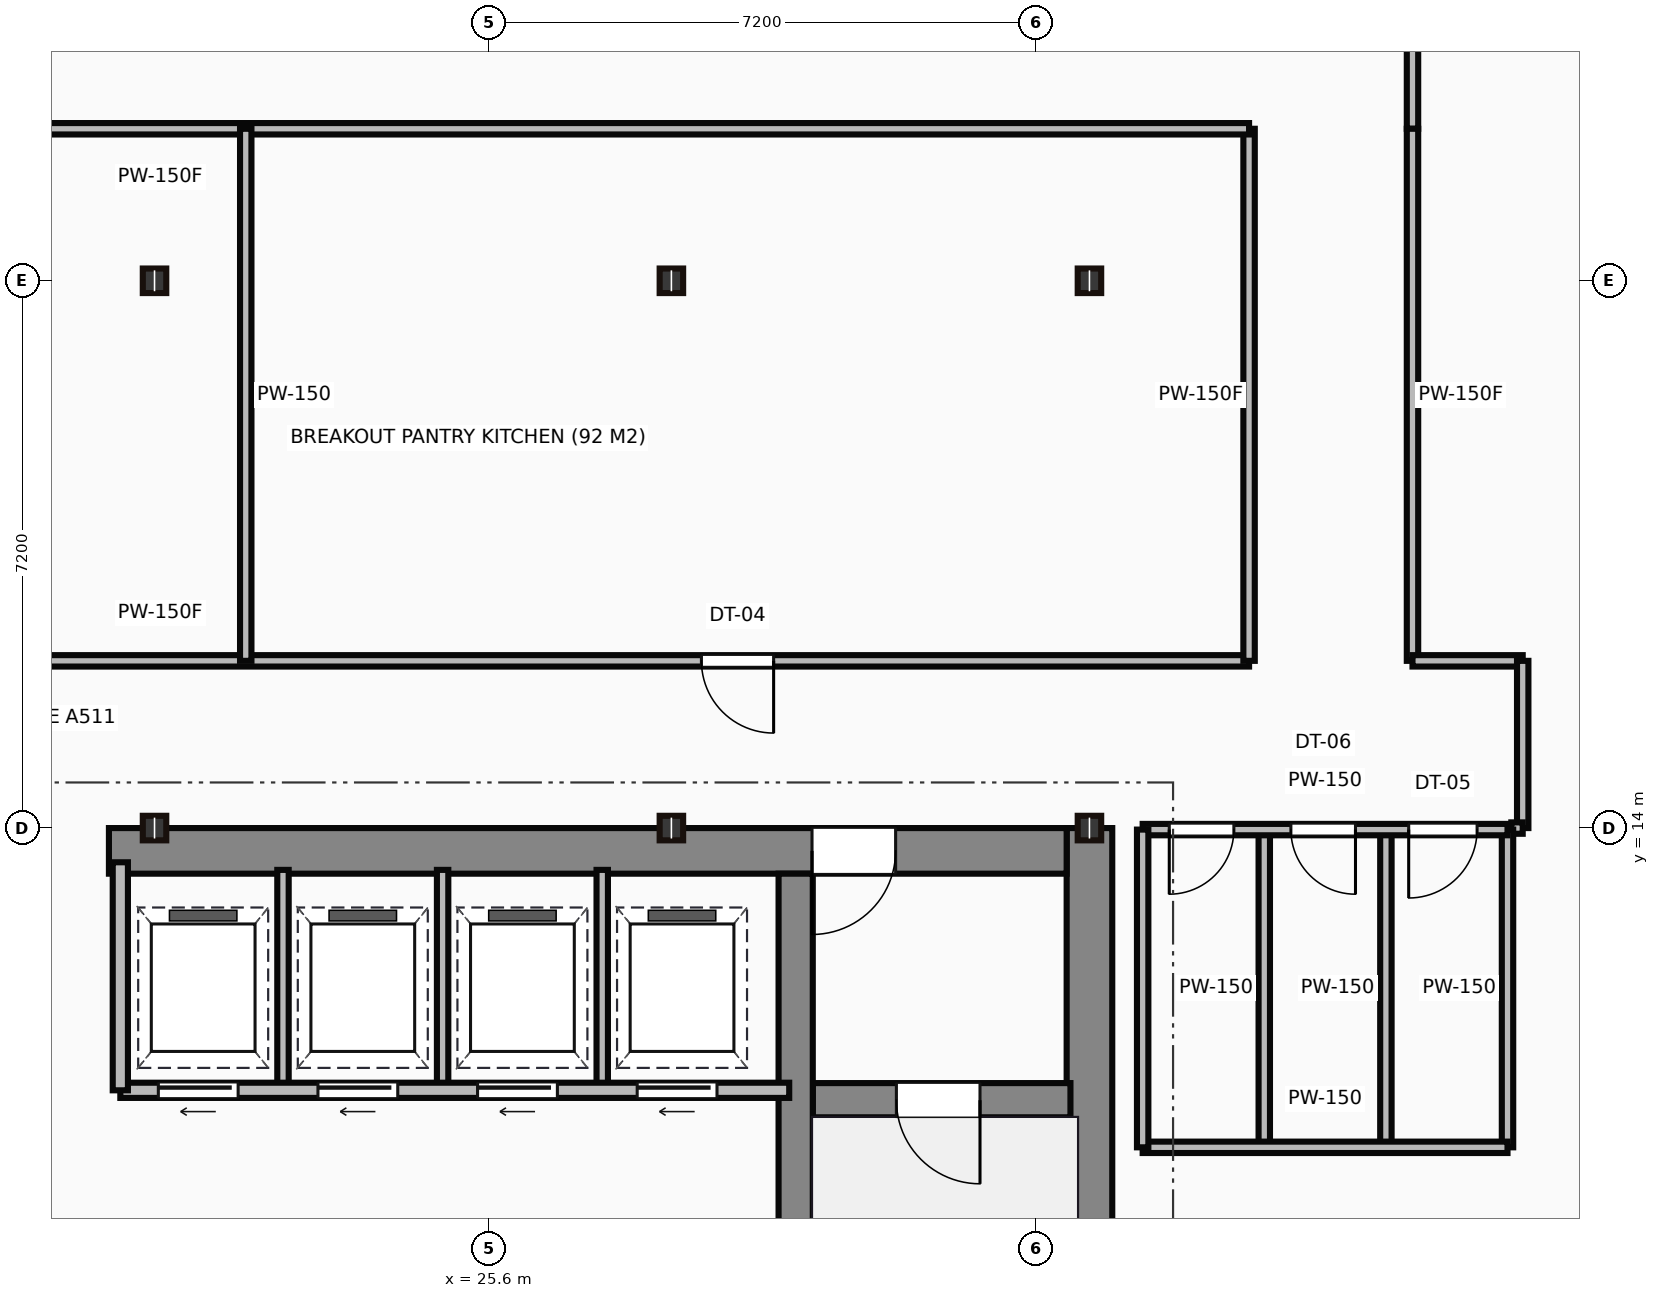
"""IFC4 building model, lengths in metres.
Left out: names, types, materials, properties, quantities, classifications, styles, units other than length and angle.
Written with IfcOpenShell. Run it as: python <this file> out.ifc"""

import sys

from ifc_helpers import new_model, si_unit, direction, frame, frame_2d, origin, origin_2d, place, context, subcontext, project, spatial, rectangle, i_section, extrude, source, transform, mapped, element, fill, save


model = new_model("IFC4")
c1 = context("Model", 3, precision=1e-05, world=origin(), true_north=direction((0.0, 1.0)))
c2 = subcontext(c1, "Body", "Model", "MODEL_VIEW")
j1 = project(units=[si_unit("LENGTHUNIT", "METRE"), si_unit("PLANEANGLEUNIT", "RADIAN")], contexts=[c1])
p1 = place(None, origin())
s1 = spatial("IfcSite", under=j1, at=p1, CompositionType="ELEMENT")
p2 = place(p1, origin())
s2 = spatial("IfcBuilding", under=s1, at=p2, CompositionType="ELEMENT")
p3 = place(p2, frame((0.0, 0.0, 251.5)))
s3 = spatial("IfcBuildingStorey", under=s2, at=p3, CompositionType="ELEMENT", Elevation=251.5)
m1 = source(origin(), c2, "Body", "SweptSolid", [
    extrude(rectangle(XDim=13.1, YDim=0.6, at=frame_2d((6.55, 0.0))), origin(), (0.0, 0.0, 1.0), 3.65),
])
p4 = place(p3, frame((33.5, 0.9, 0.0), z_axis=(0.0, 0.0, 1.0), x_axis=(0.0, 1.0, 0.0)))
e1 = element("IfcWall", 1, at=p4, inside=s3, PredefinedType="SHEAR", context=c2, shape_type="MappedRepresentation", body=[
    mapped(m1, transform((0.0, 0.0, 0.0))),
])
m2 = source(origin(), c2, "Body", "SweptSolid", [
    extrude(rectangle(XDim=12.6, YDim=0.6, at=frame_2d((6.3, 0.0))), origin(), (0.0, 0.0, 1.0), 3.65),
])
p5 = place(p3, frame((20.6, 13.7, 0.0), z_axis=(0.0, 0.0, 1.0), x_axis=(1.0, 0.0, 0.0)))
e2 = element("IfcWall", 2, at=p5, inside=s3, PredefinedType="SHEAR", context=c2, shape_type="MappedRepresentation", body=[
    mapped(m2, transform((0.0, 0.0, 0.0))),
])
p6 = place(p5, frame((9.25, 0.0, 0.0)))
e3 = element("IfcOpeningElement", 3, at=p6, cuts=e2, PredefinedType="OPENING", context=c2, shape_type="SweptSolid", body=[
    extrude(rectangle(XDim=1.1, YDim=2.15, at=frame_2d((0.55, 1.075))), frame((0.0, 0.31, 0.0), z_axis=(0.0, -1.0, 0.0), x_axis=(1.0, 0.0, 0.0)), (0.0, 0.0, 1.0), 0.62),
])
m3 = source(origin(), c2, "Body", "SweptSolid", [
    extrude(rectangle(XDim=12.5, YDim=0.45, at=frame_2d((6.25, 0.0))), origin(), (0.0, 0.0, 1.0), 3.65),
])
p7 = place(p3, frame((29.635, 0.9, 0.0), z_axis=(0.0, 0.0, 1.0), x_axis=(0.0, 1.0, 0.0)))
e4 = element("IfcWall", 4, at=p7, inside=s3, PredefinedType="SHEAR", context=c2, shape_type="MappedRepresentation", body=[
    mapped(m3, transform((0.0, 0.0, 0.0))),
])
m4 = source(origin(), c2, "Body", "SweptSolid", [
    extrude(rectangle(XDim=3.39, YDim=0.45, at=frame_2d((1.695, 0.0))), origin(), (0.0, 0.0, 1.0), 3.65),
])
p8 = place(p3, frame((29.86, 10.42, 0.0), z_axis=(0.0, 0.0, 1.0), x_axis=(1.0, 0.0, 0.0)))
e5 = element("IfcWall", 5, at=p8, inside=s3, PredefinedType="SHEAR", context=c2, shape_type="MappedRepresentation", body=[
    mapped(m4, transform((0.0, 0.0, 0.0))),
])
p9 = place(p8, frame((1.1, 0.0, 0.0)))
e6 = element("IfcOpeningElement", 6, at=p9, cuts=e5, PredefinedType="OPENING", context=c2, shape_type="SweptSolid", body=[
    extrude(rectangle(XDim=1.1, YDim=2.15, at=frame_2d((0.55, 1.075))), frame((0.0, 0.235, 0.0), z_axis=(0.0, -1.0, 0.0), x_axis=(1.0, 0.0, 0.0)), (0.0, 0.0, 1.0), 0.47),
])
m5 = source(origin(), c2, "Body", "SweptSolid", [
    extrude(i_section(OverallWidth=0.309, OverallDepth=0.323, WebThickness=0.014, FlangeThickness=0.023, at=origin_2d()), origin(), (0.0, 0.0, 1.0), 3.65),
])
for number, where, z_axis, x_axis in (
    (7, (21.2, 14.0, 0.0), (0.0, 0.0, 1.0), (1.0, 0.0, 0.0)),
    (8, (21.2, 21.2, 0.0), (0.0, 0.0, 1.0), (1.0, 0.0, 0.0)),
    (9, (28.0, 14.0, 0.0), (0.0, 0.0, 1.0), (1.0, 0.0, 0.0)),
    (10, (28.0, 21.2, 0.0), (0.0, 0.0, 1.0), (1.0, 0.0, 0.0)),
    (11, (33.5, 14.0, 0.0), (0.0, 0.0, 1.0), (1.0, 0.0, 0.0)),
    (12, (33.5, 21.2, 0.0), (0.0, 0.0, 1.0), (1.0, 0.0, 0.0)),
):
    element("IfcColumn", number, at=place(p3, frame(where, z_axis=z_axis, x_axis=x_axis)), inside=s3, PredefinedType="COLUMN", context=c2, shape_type="MappedRepresentation", body=[
        mapped(m5, transform((0.0, 0.0, 0.0))),
    ])
m6 = source(origin(), c2, "Body", "SweptSolid", [
    extrude(rectangle(XDim=8.8, YDim=0.2, at=frame_2d((4.4, 0.0))), origin(), (0.0, 0.0, 1.0), 3.4),
])
p10 = place(p3, frame((20.75, 10.55, 0.0), z_axis=(0.0, 0.0, 1.0), x_axis=(1.0, 0.0, 0.0)))
e13 = element("IfcWall", 13, at=p10, inside=s3, PredefinedType="PARTITIONING", context=c2, shape_type="MappedRepresentation", body=[
    mapped(m6, transform((0.0, 0.0, 0.0))),
])
p11 = place(p10, frame((0.5, 0.0, 0.0)))
e14 = element("IfcOpeningElement", 14, at=p11, cuts=e13, PredefinedType="OPENING", context=c2, shape_type="SweptSolid", body=[
    extrude(rectangle(XDim=1.05, YDim=2.15, at=frame_2d((0.525, 1.075))), frame((0.0, 0.11, 0.0), z_axis=(0.0, -1.0, 0.0), x_axis=(1.0, 0.0, 0.0)), (0.0, 0.0, 1.0), 0.22),
])
p12 = place(p10, frame((2.6, 0.0, 0.0)))
e15 = element("IfcOpeningElement", 15, at=p12, cuts=e13, PredefinedType="OPENING", context=c2, shape_type="SweptSolid", body=[
    extrude(rectangle(XDim=1.05, YDim=2.15, at=frame_2d((0.525, 1.075))), frame((0.0, 0.11, 0.0), z_axis=(0.0, -1.0, 0.0), x_axis=(1.0, 0.0, 0.0)), (0.0, 0.0, 1.0), 0.22),
])
p13 = place(p10, frame((4.7, 0.0, 0.0)))
e16 = element("IfcOpeningElement", 16, at=p13, cuts=e13, PredefinedType="OPENING", context=c2, shape_type="SweptSolid", body=[
    extrude(rectangle(XDim=1.05, YDim=2.15, at=frame_2d((0.525, 1.075))), frame((0.0, 0.11, 0.0), z_axis=(0.0, -1.0, 0.0), x_axis=(1.0, 0.0, 0.0)), (0.0, 0.0, 1.0), 0.22),
])
p14 = place(p10, frame((6.8, 0.0, 0.0)))
e17 = element("IfcOpeningElement", 17, at=p14, cuts=e13, PredefinedType="OPENING", context=c2, shape_type="SweptSolid", body=[
    extrude(rectangle(XDim=1.05, YDim=2.15, at=frame_2d((0.525, 1.075))), frame((0.0, 0.11, 0.0), z_axis=(0.0, -1.0, 0.0), x_axis=(1.0, 0.0, 0.0)), (0.0, 0.0, 1.0), 0.22),
])
m7 = source(origin(), c2, "Body", "SweptSolid", [
    extrude(rectangle(XDim=3.0, YDim=0.2, at=frame_2d((1.5, 0.0))), origin(), (0.0, 0.0, 1.0), 3.4),
])
p15 = place(p3, frame((20.75, 10.55, 0.0), z_axis=(0.0, 0.0, 1.0), x_axis=(0.0, 1.0, 0.0)))
e18 = element("IfcWall", 18, at=p15, inside=s3, PredefinedType="PARTITIONING", context=c2, shape_type="MappedRepresentation", body=[
    mapped(m7, transform((0.0, 0.0, 0.0))),
])
m8 = source(origin(), c2, "Body", "SweptSolid", [
    extrude(rectangle(XDim=2.85, YDim=0.15, at=frame_2d((1.425, 0.0))), origin(), (0.0, 0.0, 1.0), 3.4),
])
for number, where, z_axis, x_axis in (
    (19, (22.89, 10.6, 0.0), (0.0, 0.0, 1.0), (0.0, 1.0, 0.0)),
    (20, (24.99, 10.6, 0.0), (0.0, 0.0, 1.0), (0.0, 1.0, 0.0)),
    (21, (27.09, 10.6, 0.0), (0.0, 0.0, 1.0), (0.0, 1.0, 0.0)),
):
    element("IfcWall", number, at=place(p3, frame(where, z_axis=z_axis, x_axis=x_axis)), inside=s3, PredefinedType="PARTITIONING", context=c2, shape_type="MappedRepresentation", body=[
        mapped(m8, transform((0.0, 0.0, 0.0))),
    ])
m9 = source(origin(), c2, "Body", "SweptSolid", [
    extrude(rectangle(XDim=4.8, YDim=0.15, at=frame_2d((2.4, 0.0))), origin(), (0.0, 0.0, 1.0), 2.787),
])
p16 = place(p3, frame((34.2, 13.98, 0.0), z_axis=(0.0, 0.0, 1.0), x_axis=(1.0, 0.0, 0.0)))
e22 = element("IfcWall", 22, at=p16, inside=s3, PredefinedType="PARTITIONING", context=c2, shape_type="MappedRepresentation", body=[
    mapped(m9, transform((0.0, 0.0, 0.0))),
])
p17 = place(p16, frame((0.35, 0.0, 0.0)))
e23 = element("IfcOpeningElement", 23, at=p17, cuts=e22, PredefinedType="OPENING", context=c2, shape_type="SweptSolid", body=[
    extrude(rectangle(XDim=0.85, YDim=2.1, at=frame_2d((0.425, 1.05))), frame((0.0, 0.085, 0.0), z_axis=(0.0, -1.0, 0.0), x_axis=(1.0, 0.0, 0.0)), (0.0, 0.0, 1.0), 0.17),
])
p18 = place(p16, frame((1.95, 0.0, 0.0)))
e24 = element("IfcOpeningElement", 24, at=p18, cuts=e22, PredefinedType="OPENING", context=c2, shape_type="SweptSolid", body=[
    extrude(rectangle(XDim=0.85, YDim=2.1, at=frame_2d((0.425, 1.05))), frame((0.0, 0.085, 0.0), z_axis=(0.0, -1.0, 0.0), x_axis=(1.0, 0.0, 0.0)), (0.0, 0.0, 1.0), 0.17),
])
p19 = place(p16, frame((3.5, 0.0, 0.0)))
e25 = element("IfcOpeningElement", 25, at=p19, cuts=e22, PredefinedType="OPENING", context=c2, shape_type="SweptSolid", body=[
    extrude(rectangle(XDim=0.9, YDim=2.1, at=frame_2d((0.45, 1.05))), frame((0.0, 0.085, 0.0), z_axis=(0.0, -1.0, 0.0), x_axis=(1.0, 0.0, 0.0)), (0.0, 0.0, 1.0), 0.17),
])
m10 = source(origin(), c2, "Body", "SweptSolid", [
    extrude(rectangle(XDim=4.8, YDim=0.15, at=frame_2d((2.4, 0.0))), origin(), (0.0, 0.0, 1.0), 3.4),
])
p20 = place(p3, frame((34.2, 9.8, 0.0), z_axis=(0.0, 0.0, 1.0), x_axis=(1.0, 0.0, 0.0)))
e26 = element("IfcWall", 26, at=p20, inside=s3, PredefinedType="PARTITIONING", context=c2, shape_type="MappedRepresentation", body=[
    mapped(m10, transform((0.0, 0.0, 0.0))),
])
m11 = source(origin(), c2, "Body", "SweptSolid", [
    extrude(rectangle(XDim=4.18, YDim=0.15, at=frame_2d((2.09, 0.0))), origin(), (0.0, 0.0, 1.0), 3.4),
])
for number, where, z_axis, x_axis in (
    (27, (39.0, 9.8, 0.0), (0.0, 0.0, 1.0), (0.0, 1.0, 0.0)),
    (28, (34.2, 9.8, 0.0), (0.0, 0.0, 1.0), (0.0, 1.0, 0.0)),
    (29, (35.8, 9.8, 0.0), (0.0, 0.0, 1.0), (0.0, 1.0, 0.0)),
    (30, (37.4, 9.8, 0.0), (0.0, 0.0, 1.0), (0.0, 1.0, 0.0)),
):
    element("IfcWall", number, at=place(p3, frame(where, z_axis=z_axis, x_axis=x_axis)), inside=s3, PredefinedType="PARTITIONING", context=c2, shape_type="MappedRepresentation", body=[
        mapped(m11, transform((0.0, 0.0, 0.0))),
    ])
m12 = source(origin(), c2, "Body", "SweptSolid", [
    extrude(rectangle(XDim=2.0, YDim=0.15, at=frame_2d((1.0, 0.0))), origin(), (0.0, 0.0, 1.0), 3.4),
])
p21 = place(p3, frame((37.75, 25.2, 0.0), z_axis=(0.0, 0.0, 1.0), x_axis=(0.0, -1.0, 0.0)))
e31 = element("IfcWall", 31, at=p21, inside=s3, PredefinedType="PARTITIONING", context=c2, shape_type="MappedRepresentation", body=[
    mapped(m12, transform((0.0, 0.0, 0.0))),
])
m13 = source(origin(), c2, "Body", "SweptSolid", [
    extrude(rectangle(XDim=7.0, YDim=0.15, at=frame_2d((3.5, 0.0))), origin(), (0.0, 0.0, 1.0), 3.4),
])
p22 = place(p3, frame((37.75, 23.2, 0.0), z_axis=(0.0, 0.0, 1.0), x_axis=(0.0, -1.0, 0.0)))
e32 = element("IfcWall", 32, at=p22, inside=s3, PredefinedType="PARTITIONING", context=c2, shape_type="MappedRepresentation", body=[
    mapped(m13, transform((0.0, 0.0, 0.0))),
])
m14 = source(origin(), c2, "Body", "SweptSolid", [
    extrude(rectangle(XDim=1.45, YDim=0.15, at=frame_2d((0.725, 0.0))), origin(), (0.0, 0.0, 1.0), 3.4),
])
p23 = place(p3, frame((37.75, 16.2, 0.0), z_axis=(0.0, 0.0, 1.0), x_axis=(1.0, 0.0, 0.0)))
e33 = element("IfcWall", 33, at=p23, inside=s3, PredefinedType="PARTITIONING", context=c2, shape_type="MappedRepresentation", body=[
    mapped(m14, transform((0.0, 0.0, 0.0))),
])
m15 = source(origin(), c2, "Body", "SweptSolid", [
    extrude(rectangle(XDim=2.2, YDim=0.15, at=frame_2d((1.1, 0.0))), origin(), (0.0, 0.0, 1.0), 3.4),
])
p24 = place(p3, frame((39.2, 16.2, 0.0), z_axis=(0.0, 0.0, 1.0), x_axis=(0.0, -1.0, 0.0)))
e34 = element("IfcWall", 34, at=p24, inside=s3, PredefinedType="PARTITIONING", context=c2, shape_type="MappedRepresentation", body=[
    mapped(m15, transform((0.0, 0.0, 0.0))),
])
m16 = source(origin(), c2, "Body", "SweptSolid", [
    extrude(rectangle(XDim=0.15, YDim=0.15, at=frame_2d((0.075, 0.0))), origin(), (0.0, 0.0, 1.0), 3.4),
])
p25 = place(p3, frame((39.2, 14.0, 0.0), z_axis=(0.0, 0.0, 1.0), x_axis=(-1.0, 0.0, 0.0)))
e35 = element("IfcWall", 35, at=p25, inside=s3, PredefinedType="PARTITIONING", context=c2, shape_type="MappedRepresentation", body=[
    mapped(m16, transform((0.0, 0.0, 0.0))),
])
m17 = source(origin(), c2, "Body", "SweptSolid", [
    extrude(rectangle(XDim=28.65, YDim=0.15, at=frame_2d((14.325, 0.0))), origin(), (0.0, 0.0, 1.0), 3.4),
])
p26 = place(p3, frame((6.95, 16.2, 0.0), z_axis=(0.0, 0.0, 1.0), x_axis=(1.0, 0.0, 0.0)))
e36 = element("IfcWall", 36, at=p26, inside=s3, PredefinedType="PARTITIONING", context=c2, shape_type="MappedRepresentation", body=[
    mapped(m17, transform((0.0, 0.0, 0.0))),
])
p27 = place(p26, frame((21.445, 0.0, 0.0)))
e37 = element("IfcOpeningElement", 37, at=p27, cuts=e36, PredefinedType="OPENING", context=c2, shape_type="SweptSolid", body=[
    extrude(rectangle(XDim=0.95, YDim=2.15, at=frame_2d((0.475, 1.075))), frame((0.0, 0.085, 0.0), z_axis=(0.0, -1.0, 0.0), x_axis=(1.0, 0.0, 0.0)), (0.0, 0.0, 1.0), 0.17),
])
p28 = place(p3, frame((35.6, 16.2, 0.0), z_axis=(0.0, 0.0, 1.0), x_axis=(0.0, 1.0, 0.0)))
e38 = element("IfcWall", 38, at=p28, inside=s3, PredefinedType="PARTITIONING", context=c2, shape_type="MappedRepresentation", body=[
    mapped(m13, transform((0.0, 0.0, 0.0))),
])
p29 = place(p3, frame((35.6, 23.2, 0.0), z_axis=(0.0, 0.0, 1.0), x_axis=(-1.0, 0.0, 0.0)))
e39 = element("IfcWall", 39, at=p29, inside=s3, PredefinedType="PARTITIONING", context=c2, shape_type="MappedRepresentation", body=[
    mapped(m17, transform((0.0, 0.0, 0.0))),
])
p30 = place(p29, frame((24.12, 0.0, 0.0)))
e40 = element("IfcOpeningElement", 40, at=p30, cuts=e39, PredefinedType="OPENING", context=c2, shape_type="SweptSolid", body=[
    extrude(rectangle(XDim=0.95, YDim=2.15, at=frame_2d((0.475, 1.075))), frame((0.0, 0.085, 0.0), z_axis=(0.0, -1.0, 0.0), x_axis=(1.0, 0.0, 0.0)), (0.0, 0.0, 1.0), 0.17),
])
p31 = place(p29, frame((16.525, 0.0, 0.0)))
e41 = element("IfcOpeningElement", 41, at=p31, cuts=e39, PredefinedType="OPENING", context=c2, shape_type="SweptSolid", body=[
    extrude(rectangle(XDim=0.95, YDim=2.15, at=frame_2d((0.475, 1.075))), frame((0.0, 0.085, 0.0), z_axis=(0.0, -1.0, 0.0), x_axis=(1.0, 0.0, 0.0)), (0.0, 0.0, 1.0), 0.17),
])
p32 = place(p3, frame((22.4, 23.2, 0.0), z_axis=(0.0, 0.0, 1.0), x_axis=(0.0, -1.0, 0.0)))
e42 = element("IfcWall", 42, at=p32, inside=s3, PredefinedType="PARTITIONING", context=c2, shape_type="MappedRepresentation", body=[
    mapped(m13, transform((0.0, 0.0, 0.0))),
])
m18 = source(origin(), c2, "Body", "SweptSolid", [
    extrude(rectangle(XDim=1.1, YDim=2.15, at=frame_2d((0.55, 1.075))), frame((0.0, 0.025, 0.0), z_axis=(0.0, -1.0, 0.0), x_axis=(1.0, 0.0, 0.0)), (0.0, 0.0, 1.0), 0.05),
])
p33 = place(p9, frame((1.1, 0.0, 0.0), z_axis=(0.0, 0.0, 1.0), x_axis=(-1.0, 0.0, 0.0)))
e43 = element("IfcDoor", 43, at=p33, inside=s3, OperationType="SINGLE_SWING_RIGHT", PredefinedType="DOOR", context=c2, shape_type="MappedRepresentation", body=[
    mapped(m18, transform((0.0, 0.0, 0.0))),
])
fill(e6, e43)
p34 = place(p6, origin())
e44 = element("IfcDoor", 44, at=p34, inside=s3, OperationType="SINGLE_SWING_LEFT", PredefinedType="DOOR", context=c2, shape_type="MappedRepresentation", body=[
    mapped(m18, transform((0.0, 0.0, 0.0))),
])
fill(e3, e44)
m19 = source(origin(), c2, "Body", "SweptSolid", [
    extrude(rectangle(XDim=1.05, YDim=2.15, at=frame_2d((0.525, 1.075))), frame((0.0, 0.025, 0.0), z_axis=(0.0, -1.0, 0.0), x_axis=(1.0, 0.0, 0.0)), (0.0, 0.0, 1.0), 0.05),
])
p35 = place(p11, frame((1.05, 0.0, 0.0), z_axis=(0.0, 0.0, 1.0), x_axis=(-1.0, 0.0, 0.0)))
e45 = element("IfcDoor", 45, at=p35, inside=s3, OperationType="SLIDING_TO_LEFT", PredefinedType="DOOR", context=c2, shape_type="MappedRepresentation", body=[
    mapped(m19, transform((0.0, 0.0, 0.0))),
])
fill(e14, e45)
p36 = place(p12, frame((1.05, 0.0, 0.0), z_axis=(0.0, 0.0, 1.0), x_axis=(-1.0, 0.0, 0.0)))
e46 = element("IfcDoor", 46, at=p36, inside=s3, OperationType="SLIDING_TO_LEFT", PredefinedType="DOOR", context=c2, shape_type="MappedRepresentation", body=[
    mapped(m19, transform((0.0, 0.0, 0.0))),
])
fill(e15, e46)
p37 = place(p13, frame((1.05, 0.0, 0.0), z_axis=(0.0, 0.0, 1.0), x_axis=(-1.0, 0.0, 0.0)))
e47 = element("IfcDoor", 47, at=p37, inside=s3, OperationType="SLIDING_TO_LEFT", PredefinedType="DOOR", context=c2, shape_type="MappedRepresentation", body=[
    mapped(m19, transform((0.0, 0.0, 0.0))),
])
fill(e16, e47)
p38 = place(p14, frame((1.05, 0.0, 0.0), z_axis=(0.0, 0.0, 1.0), x_axis=(-1.0, 0.0, 0.0)))
e48 = element("IfcDoor", 48, at=p38, inside=s3, OperationType="SLIDING_TO_LEFT", PredefinedType="DOOR", context=c2, shape_type="MappedRepresentation", body=[
    mapped(m19, transform((0.0, 0.0, 0.0))),
])
fill(e17, e48)
m20 = source(origin(), c2, "Body", "SweptSolid", [
    extrude(rectangle(XDim=0.85, YDim=2.1, at=frame_2d((0.425, 1.05))), frame((0.0, 0.025, 0.0), z_axis=(0.0, -1.0, 0.0), x_axis=(1.0, 0.0, 0.0)), (0.0, 0.0, 1.0), 0.05),
])
p39 = place(p17, frame((0.85, 0.0, 0.0), z_axis=(0.0, 0.0, 1.0), x_axis=(-1.0, 0.0, 0.0)))
e49 = element("IfcDoor", 49, at=p39, inside=s3, OperationType="SINGLE_SWING_LEFT", PredefinedType="DOOR", context=c2, shape_type="MappedRepresentation", body=[
    mapped(m20, transform((0.0, 0.0, 0.0))),
])
fill(e23, e49)
p40 = place(p18, frame((0.85, 0.0, 0.0), z_axis=(0.0, 0.0, 1.0), x_axis=(-1.0, 0.0, 0.0)))
e50 = element("IfcDoor", 50, at=p40, inside=s3, OperationType="SINGLE_SWING_RIGHT", PredefinedType="DOOR", context=c2, shape_type="MappedRepresentation", body=[
    mapped(m20, transform((0.0, 0.0, 0.0))),
])
fill(e24, e50)
m21 = source(origin(), c2, "Body", "SweptSolid", [
    extrude(rectangle(XDim=0.9, YDim=2.1, at=frame_2d((0.45, 1.05))), frame((0.0, 0.025, 0.0), z_axis=(0.0, -1.0, 0.0), x_axis=(1.0, 0.0, 0.0)), (0.0, 0.0, 1.0), 0.05),
])
p41 = place(p19, frame((0.9, 0.0, 0.0), z_axis=(0.0, 0.0, 1.0), x_axis=(-1.0, 0.0, 0.0)))
e51 = element("IfcDoor", 51, at=p41, inside=s3, OperationType="SINGLE_SWING_LEFT", PredefinedType="DOOR", context=c2, shape_type="MappedRepresentation", body=[
    mapped(m21, transform((0.0, 0.0, 0.0))),
])
fill(e25, e51)
m22 = source(origin(), c2, "Body", "SweptSolid", [
    extrude(rectangle(XDim=0.95, YDim=2.15, at=frame_2d((0.475, 1.075))), frame((0.0, 0.025, 0.0), z_axis=(0.0, -1.0, 0.0), x_axis=(1.0, 0.0, 0.0)), (0.0, 0.0, 1.0), 0.05),
])
p42 = place(p27, origin())
e52 = element("IfcDoor", 52, at=p42, inside=s3, OperationType="SINGLE_SWING_RIGHT", PredefinedType="DOOR", context=c2, shape_type="MappedRepresentation", body=[
    mapped(m22, transform((0.0, 0.0, 0.0))),
])
fill(e37, e52)
save(model, sys.argv[1])
